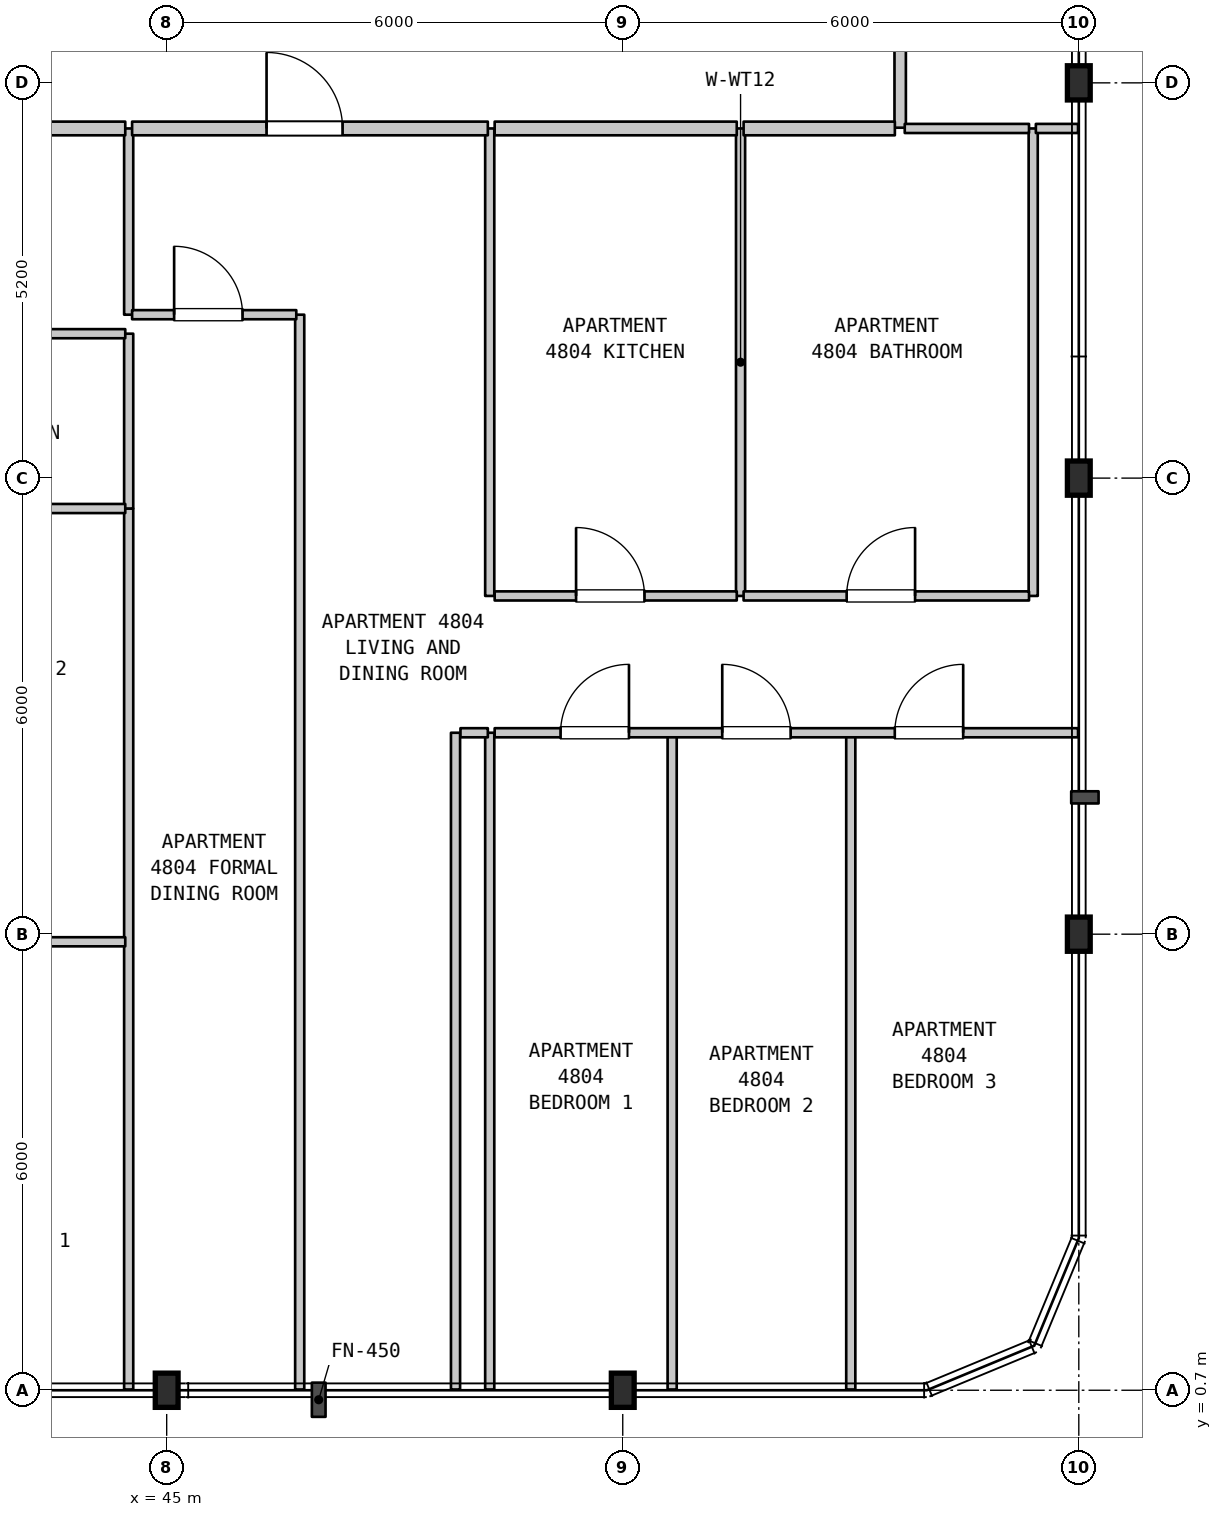
"""IFC4 building model, lengths in metres.
Left out: names, types, materials, properties, quantities, classifications, styles, units other than length and angle.
Written with IfcOpenShell. Run it as: python <this file> out.ifc"""

import sys

from ifc_helpers import new_model, si_unit, direction, frame, frame_2d, origin, origin_2d, place, context, subcontext, project, spatial, rectangle, i_section, extrude, element, fill, save


model = new_model("IFC4")
c1 = context("Model", 3, precision=1e-05, world=origin(), true_north=direction((0.0, 1.0)))
c2 = subcontext(c1, "Body", "Model", "MODEL_VIEW")
j1 = project(units=[si_unit("LENGTHUNIT", "METRE"), si_unit("PLANEANGLEUNIT", "RADIAN")], contexts=[c1])
p1 = place(None, origin())
s1 = spatial("IfcSite", under=j1, at=p1, CompositionType="ELEMENT")
p2 = place(p1, origin())
s2 = spatial("IfcBuilding", under=s1, at=p2, CompositionType="ELEMENT")
p3 = place(p2, frame((0.0, 0.0, 195.8)))
s3 = spatial("IfcBuildingStorey", under=s2, at=p3, CompositionType="ELEMENT", Elevation=195.8)
for number, where, z_axis, x_axis in (
    (1, (45.0, 0.7, 0.0), (0.0, 0.0, 1.0), (1.0, 0.0, 0.0)),
    (2, (51.0, 0.7, 0.0), (0.0, 0.0, 1.0), (1.0, 0.0, 0.0)),
    (3, (57.0, 6.7, 0.0), (0.0, 0.0, 1.0), (1.0, 0.0, 0.0)),
    (4, (57.0, 12.7, 0.0), (0.0, 0.0, 1.0), (1.0, 0.0, 0.0)),
    (5, (57.0, 17.9, 0.0), (0.0, 0.0, 1.0), (1.0, 0.0, 0.0)),
):
    element("IfcColumn", number, at=place(p3, frame(where, z_axis=z_axis, x_axis=x_axis)), inside=s3, PredefinedType="COLUMN", context=c2, shape_type="SweptSolid", body=[
        extrude(i_section(OverallWidth=0.3, OverallDepth=0.45, WebThickness=0.014, FlangeThickness=0.026, FilletRadius=0.027, at=origin_2d()), origin(), (0.0, 0.0, 1.0), 3.7),
    ])
p4 = place(p3, frame((44.5, 0.71, 0.0), z_axis=(0.0, 0.0, 1.0), x_axis=(0.0, 1.0, 0.0)))
e6 = element("IfcWall", 6, at=p4, inside=s3, PredefinedType="PARTITIONING", context=c2, shape_type="SweptSolid", body=[
    extrude(rectangle(XDim=11.59, YDim=0.12, at=frame_2d((5.795, 0.0))), origin(), (0.0, 0.0, 1.0), 3.39),
])
p5 = place(p3, frame((44.5, 12.3, 0.0), z_axis=(0.0, 0.0, 1.0), x_axis=(0.0, 1.0, 0.0)))
e7 = element("IfcWall", 7, at=p5, inside=s3, PredefinedType="PARTITIONING", context=c2, shape_type="SweptSolid", body=[
    extrude(rectangle(XDim=2.3, YDim=0.12, at=frame_2d((1.15, 0.0))), origin(), (0.0, 0.0, 1.0), 3.39),
])
p6 = place(p3, frame((44.5, 14.85, 0.0), z_axis=(0.0, 0.0, 1.0), x_axis=(0.0, 1.0, 0.0)))
e8 = element("IfcWall", 8, at=p6, inside=s3, PredefinedType="PARTITIONING", context=c2, shape_type="SweptSolid", body=[
    extrude(rectangle(XDim=2.45, YDim=0.12, at=frame_2d((1.225, 0.0))), origin(), (0.0, 0.0, 1.0), 3.39),
])
p7 = place(p3, frame((46.75, 0.71, 0.0), z_axis=(0.0, 0.0, 1.0), x_axis=(0.0, 1.0, 0.0)))
e9 = element("IfcWall", 9, at=p7, inside=s3, PredefinedType="PARTITIONING", context=c2, shape_type="SweptSolid", body=[
    extrude(rectangle(XDim=14.14, YDim=0.12, at=frame_2d((7.07, 0.0))), origin(), (0.0, 0.0, 1.0), 3.39),
])
for number, where, z_axis, x_axis in (
    (10, (48.8, 0.71, 0.0), (0.0, 0.0, 1.0), (0.0, 1.0, 0.0)),
    (11, (49.25, 0.71, 0.0), (0.0, 0.0, 1.0), (0.0, 1.0, 0.0)),
):
    element("IfcWall", number, at=place(p3, frame(where, z_axis=z_axis, x_axis=x_axis)), inside=s3, PredefinedType="PARTITIONING", context=c2, shape_type="SweptSolid", body=[
        extrude(rectangle(XDim=8.64, YDim=0.12, at=frame_2d((4.32, 0.0))), origin(), (0.0, 0.0, 1.0), 3.39),
    ])
p8 = place(p3, frame((49.25, 11.15, 0.0), z_axis=(0.0, 0.0, 1.0), x_axis=(0.0, 1.0, 0.0)))
e12 = element("IfcWall", 12, at=p8, inside=s3, PredefinedType="PARTITIONING", context=c2, shape_type="SweptSolid", body=[
    extrude(rectangle(XDim=6.15, YDim=0.12, at=frame_2d((3.075, 0.0))), origin(), (0.0, 0.0, 1.0), 3.39),
])
p9 = place(p3, frame((51.65, 0.71, 0.0), z_axis=(0.0, 0.0, 1.0), x_axis=(0.0, 1.0, 0.0)))
e13 = element("IfcWall", 13, at=p9, inside=s3, PredefinedType="PARTITIONING", context=c2, shape_type="SweptSolid", body=[
    extrude(rectangle(XDim=8.64, YDim=0.12, at=frame_2d((4.32, 0.0))), origin(), (0.0, 0.0, 1.0), 3.39),
])
p10 = place(p3, frame((52.55, 11.15, 0.0), z_axis=(0.0, 0.0, 1.0), x_axis=(0.0, 1.0, 0.0)))
e14 = element("IfcWall", 14, at=p10, inside=s3, PredefinedType="PARTITIONING", context=c2, shape_type="SweptSolid", body=[
    extrude(rectangle(XDim=6.15, YDim=0.12, at=frame_2d((3.075, 0.0))), origin(), (0.0, 0.0, 1.0), 3.39),
])
p11 = place(p3, frame((54.0, 0.71, 0.0), z_axis=(0.0, 0.0, 1.0), x_axis=(0.0, 1.0, 0.0)))
e15 = element("IfcWall", 15, at=p11, inside=s3, PredefinedType="PARTITIONING", context=c2, shape_type="SweptSolid", body=[
    extrude(rectangle(XDim=8.64, YDim=0.12, at=frame_2d((4.32, 0.0))), origin(), (0.0, 0.0, 1.0), 3.39),
])
p12 = place(p3, frame((54.65, 17.31, 0.0), z_axis=(0.0, 0.0, 1.0), x_axis=(0.0, 1.0, 0.0)))
e16 = element("IfcWall", 16, at=p12, inside=s3, PredefinedType="STANDARD", context=c2, shape_type="SweptSolid", body=[
    extrude(rectangle(XDim=2.19, YDim=0.15, at=frame_2d((1.095, 0.0))), origin(), (0.0, 0.0, 1.0), 3.39),
])
p13 = place(p3, frame((56.4, 11.15, 0.0), z_axis=(0.0, 0.0, 1.0), x_axis=(0.0, 1.0, 0.0)))
e17 = element("IfcWall", 17, at=p13, inside=s3, PredefinedType="PARTITIONING", context=c2, shape_type="SweptSolid", body=[
    extrude(rectangle(XDim=6.15, YDim=0.12, at=frame_2d((3.075, 0.0))), origin(), (0.0, 0.0, 1.0), 3.39),
])
p14 = place(p3, frame((40.295, 6.6, 0.0), z_axis=(0.0, 0.0, 1.0), x_axis=(1.0, 0.0, 0.0)))
e18 = element("IfcWall", 18, at=p14, inside=s3, PredefinedType="PARTITIONING", context=c2, shape_type="SweptSolid", body=[
    extrude(rectangle(XDim=4.16, YDim=0.12, at=frame_2d((2.08, 0.0))), origin(), (0.0, 0.0, 1.0), 2.79),
])
p15 = place(p3, frame((48.865, 9.35, 0.0), z_axis=(0.0, 0.0, 1.0), x_axis=(1.0, 0.0, 0.0)))
e19 = element("IfcWall", 19, at=p15, inside=s3, PredefinedType="PARTITIONING", context=c2, shape_type="SweptSolid", body=[
    extrude(rectangle(XDim=0.36, YDim=0.12, at=frame_2d((0.18, 0.0))), origin(), (0.0, 0.0, 1.0), 3.39),
])
p16 = place(p3, frame((49.315, 9.35, 0.0), z_axis=(0.0, 0.0, 1.0), x_axis=(1.0, 0.0, 0.0)))
e20 = element("IfcWall", 20, at=p16, inside=s3, PredefinedType="PARTITIONING", context=c2, shape_type="SweptSolid", body=[
    extrude(rectangle(XDim=7.675, YDim=0.12, at=frame_2d((3.837, 0.0))), origin(), (0.0, 0.0, 1.0), 3.39),
])
p17 = place(p16, frame((0.867, 0.0, 0.0)))
e21 = element("IfcOpeningElement", 21, at=p17, cuts=e20, PredefinedType="OPENING", context=c2, shape_type="SweptSolid", body=[
    extrude(rectangle(XDim=0.9, YDim=2.15, at=frame_2d((0.45, 1.075))), frame((0.0, 0.07, 0.0), z_axis=(0.0, -1.0, 0.0), x_axis=(1.0, 0.0, 0.0)), (0.0, 0.0, 1.0), 0.14),
])
p18 = place(p16, frame((2.994, 0.0, 0.0)))
e22 = element("IfcOpeningElement", 22, at=p18, cuts=e20, PredefinedType="OPENING", context=c2, shape_type="SweptSolid", body=[
    extrude(rectangle(XDim=0.9, YDim=2.15, at=frame_2d((0.45, 1.075))), frame((0.0, 0.07, 0.0), z_axis=(0.0, -1.0, 0.0), x_axis=(1.0, 0.0, 0.0)), (0.0, 0.0, 1.0), 0.14),
])
p19 = place(p16, frame((5.264, 0.0, 0.0)))
e23 = element("IfcOpeningElement", 23, at=p19, cuts=e20, PredefinedType="OPENING", context=c2, shape_type="SweptSolid", body=[
    extrude(rectangle(XDim=0.9, YDim=2.15, at=frame_2d((0.45, 1.075))), frame((0.0, 0.07, 0.0), z_axis=(0.0, -1.0, 0.0), x_axis=(1.0, 0.0, 0.0)), (0.0, 0.0, 1.0), 0.14),
])
p20 = place(p3, frame((49.315, 11.15, 0.0), z_axis=(0.0, 0.0, 1.0), x_axis=(1.0, 0.0, 0.0)))
e24 = element("IfcWall", 24, at=p20, inside=s3, PredefinedType="PARTITIONING", context=c2, shape_type="SweptSolid", body=[
    extrude(rectangle(XDim=3.185, YDim=0.12, at=frame_2d((1.593, 0.0))), origin(), (0.0, 0.0, 1.0), 3.39),
])
p21 = place(p20, frame((1.071, 0.0, 0.0)))
e25 = element("IfcOpeningElement", 25, at=p21, cuts=e24, PredefinedType="OPENING", context=c2, shape_type="SweptSolid", body=[
    extrude(rectangle(XDim=0.9, YDim=2.15, at=frame_2d((0.45, 1.075))), frame((0.0, 0.07, 0.0), z_axis=(0.0, -1.0, 0.0), x_axis=(1.0, 0.0, 0.0)), (0.0, 0.0, 1.0), 0.14),
])
p22 = place(p3, frame((52.59, 11.15, 0.0), z_axis=(0.0, 0.0, 1.0), x_axis=(1.0, 0.0, 0.0)))
e26 = element("IfcWall", 26, at=p22, inside=s3, PredefinedType="PARTITIONING", context=c2, shape_type="SweptSolid", body=[
    extrude(rectangle(XDim=3.755, YDim=0.12, at=frame_2d((1.877, 0.0))), origin(), (0.0, 0.0, 1.0), 3.39),
])
p23 = place(p22, frame((1.356, 0.0, 0.0)))
e27 = element("IfcOpeningElement", 27, at=p23, cuts=e26, PredefinedType="OPENING", context=c2, shape_type="SweptSolid", body=[
    extrude(rectangle(XDim=0.9, YDim=2.1, at=frame_2d((0.45, 1.05))), frame((0.0, 0.07, 0.0), z_axis=(0.0, -1.0, 0.0), x_axis=(1.0, 0.0, 0.0)), (0.0, 0.0, 1.0), 0.14),
])
for number, where, z_axis, x_axis in (
    (28, (40.295, 12.3, 0.0), (0.0, 0.0, 1.0), (1.0, 0.0, 0.0)),
    (29, (40.295, 14.6, 0.0), (0.0, 0.0, 1.0), (1.0, 0.0, 0.0)),
):
    element("IfcWall", number, at=place(p3, frame(where, z_axis=z_axis, x_axis=x_axis)), inside=s3, PredefinedType="PARTITIONING", context=c2, shape_type="SweptSolid", body=[
        extrude(rectangle(XDim=4.16, YDim=0.12, at=frame_2d((2.08, 0.0))), origin(), (0.0, 0.0, 1.0), 3.39),
    ])
p24 = place(p3, frame((44.545, 14.85, 0.0), z_axis=(0.0, 0.0, 1.0), x_axis=(1.0, 0.0, 0.0)))
e30 = element("IfcWall", 30, at=p24, inside=s3, PredefinedType="PARTITIONING", context=c2, shape_type="SweptSolid", body=[
    extrude(rectangle(XDim=2.16, YDim=0.12, at=frame_2d((1.08, 0.0))), origin(), (0.0, 0.0, 1.0), 3.39),
])
p25 = place(p24, frame((0.553, 0.0, 0.0)))
e31 = element("IfcOpeningElement", 31, at=p25, cuts=e30, PredefinedType="OPENING", context=c2, shape_type="SweptSolid", body=[
    extrude(rectangle(XDim=0.9, YDim=2.15, at=frame_2d((0.45, 1.075))), frame((0.0, 0.07, 0.0), z_axis=(0.0, -1.0, 0.0), x_axis=(1.0, 0.0, 0.0)), (0.0, 0.0, 1.0), 0.14),
])
p26 = place(p3, frame((40.295, 17.3, 0.0), z_axis=(0.0, 0.0, 1.0), x_axis=(1.0, 0.0, 0.0)))
e32 = element("IfcWall", 32, at=p26, inside=s3, PredefinedType="STANDARD", context=c2, shape_type="SweptSolid", body=[
    extrude(rectangle(XDim=4.16, YDim=0.18, at=frame_2d((2.08, 0.0))), origin(), (0.0, 0.0, 1.0), 3.39),
])
p27 = place(p3, frame((44.545, 17.3, 0.0), z_axis=(0.0, 0.0, 1.0), x_axis=(1.0, 0.0, 0.0)))
e33 = element("IfcWall", 33, at=p27, inside=s3, PredefinedType="STANDARD", context=c2, shape_type="SweptSolid", body=[
    extrude(rectangle(XDim=4.68, YDim=0.18, at=frame_2d((2.34, 0.0))), origin(), (0.0, 0.0, 1.0), 3.39),
])
p28 = place(p27, frame((1.769, 0.0, 0.0)))
e34 = element("IfcOpeningElement", 34, at=p28, cuts=e33, PredefinedType="OPENING", context=c2, shape_type="SweptSolid", body=[
    extrude(rectangle(XDim=1.0, YDim=2.15, at=frame_2d((0.5, 1.075))), frame((0.0, 0.1, 0.0), z_axis=(0.0, -1.0, 0.0), x_axis=(1.0, 0.0, 0.0)), (0.0, 0.0, 1.0), 0.2),
])
p29 = place(p3, frame((49.315, 17.3, 0.0), z_axis=(0.0, 0.0, 1.0), x_axis=(1.0, 0.0, 0.0)))
e35 = element("IfcWall", 35, at=p29, inside=s3, PredefinedType="STANDARD", context=c2, shape_type="SweptSolid", body=[
    extrude(rectangle(XDim=3.185, YDim=0.18, at=frame_2d((1.593, 0.0))), origin(), (0.0, 0.0, 1.0), 3.39),
])
p30 = place(p3, frame((52.59, 17.3, 0.0), z_axis=(0.0, 0.0, 1.0), x_axis=(1.0, 0.0, 0.0)))
e36 = element("IfcWall", 36, at=p30, inside=s3, PredefinedType="STANDARD", context=c2, shape_type="SweptSolid", body=[
    extrude(rectangle(XDim=1.99, YDim=0.18, at=frame_2d((0.995, 0.0))), origin(), (0.0, 0.0, 1.0), 3.39),
])
p31 = place(p3, frame((54.71, 17.3, 0.0), z_axis=(0.0, 0.0, 1.0), x_axis=(1.0, 0.0, 0.0)))
e37 = element("IfcWall", 37, at=p31, inside=s3, PredefinedType="PARTITIONING", context=c2, shape_type="SweptSolid", body=[
    extrude(rectangle(XDim=1.635, YDim=0.12, at=frame_2d((0.817, 0.0))), origin(), (0.0, 0.0, 1.0), 3.39),
])
p32 = place(p3, frame((56.435, 17.3, 0.0), z_axis=(0.0, 0.0, 1.0), x_axis=(1.0, 0.0, 0.0)))
e38 = element("IfcWall", 38, at=p32, inside=s3, PredefinedType="PARTITIONING", context=c2, shape_type="SweptSolid", body=[
    extrude(rectangle(XDim=0.555, YDim=0.12, at=frame_2d((0.277, 0.0))), origin(), (0.0, 0.0, 1.0), 3.39),
])
p33 = place(p17, origin())
e39 = element("IfcDoor", 39, at=p33, inside=s3, OperationType="SINGLE_SWING_RIGHT", PredefinedType="DOOR", context=c2, shape_type="SweptSolid", body=[
    extrude(rectangle(XDim=0.9, YDim=2.15, at=frame_2d((0.45, 1.075))), frame((0.0, 0.025, 0.0), z_axis=(0.0, -1.0, 0.0), x_axis=(1.0, 0.0, 0.0)), (0.0, 0.0, 1.0), 0.05),
])
fill(e21, e39)
p34 = place(p18, origin())
e40 = element("IfcDoor", 40, at=p34, inside=s3, OperationType="SINGLE_SWING_LEFT", PredefinedType="DOOR", context=c2, shape_type="SweptSolid", body=[
    extrude(rectangle(XDim=0.9, YDim=2.15, at=frame_2d((0.45, 1.075))), frame((0.0, 0.025, 0.0), z_axis=(0.0, -1.0, 0.0), x_axis=(1.0, 0.0, 0.0)), (0.0, 0.0, 1.0), 0.05),
])
fill(e22, e40)
p35 = place(p19, origin())
e41 = element("IfcDoor", 41, at=p35, inside=s3, OperationType="SINGLE_SWING_RIGHT", PredefinedType="DOOR", context=c2, shape_type="SweptSolid", body=[
    extrude(rectangle(XDim=0.9, YDim=2.15, at=frame_2d((0.45, 1.075))), frame((0.0, 0.025, 0.0), z_axis=(0.0, -1.0, 0.0), x_axis=(1.0, 0.0, 0.0)), (0.0, 0.0, 1.0), 0.05),
])
fill(e23, e41)
p36 = place(p21, origin())
e42 = element("IfcDoor", 42, at=p36, inside=s3, OperationType="SINGLE_SWING_LEFT", PredefinedType="DOOR", context=c2, shape_type="SweptSolid", body=[
    extrude(rectangle(XDim=0.9, YDim=2.15, at=frame_2d((0.45, 1.075))), frame((0.0, 0.025, 0.0), z_axis=(0.0, -1.0, 0.0), x_axis=(1.0, 0.0, 0.0)), (0.0, 0.0, 1.0), 0.05),
])
fill(e25, e42)
p37 = place(p23, origin())
e43 = element("IfcDoor", 43, at=p37, inside=s3, OperationType="SINGLE_SWING_RIGHT", PredefinedType="DOOR", context=c2, shape_type="SweptSolid", body=[
    extrude(rectangle(XDim=0.9, YDim=2.1, at=frame_2d((0.45, 1.05))), frame((0.0, 0.025, 0.0), z_axis=(0.0, -1.0, 0.0), x_axis=(1.0, 0.0, 0.0)), (0.0, 0.0, 1.0), 0.05),
])
fill(e27, e43)
p38 = place(p25, origin())
e44 = element("IfcDoor", 44, at=p38, inside=s3, OperationType="SINGLE_SWING_LEFT", PredefinedType="DOOR", context=c2, shape_type="SweptSolid", body=[
    extrude(rectangle(XDim=0.9, YDim=2.15, at=frame_2d((0.45, 1.075))), frame((0.0, 0.025, 0.0), z_axis=(0.0, -1.0, 0.0), x_axis=(1.0, 0.0, 0.0)), (0.0, 0.0, 1.0), 0.05),
])
fill(e31, e44)
p39 = place(p28, origin())
e45 = element("IfcDoor", 45, at=p39, inside=s3, OperationType="SINGLE_SWING_LEFT", PredefinedType="DOOR", context=c2, shape_type="SweptSolid", body=[
    extrude(rectangle(XDim=1.0, YDim=2.15, at=frame_2d((0.5, 1.075))), frame((0.0, 0.025, 0.0), z_axis=(0.0, -1.0, 0.0), x_axis=(1.0, 0.0, 0.0)), (0.0, 0.0, 1.0), 0.05),
])
fill(e34, e45)
save(model, sys.argv[1])
